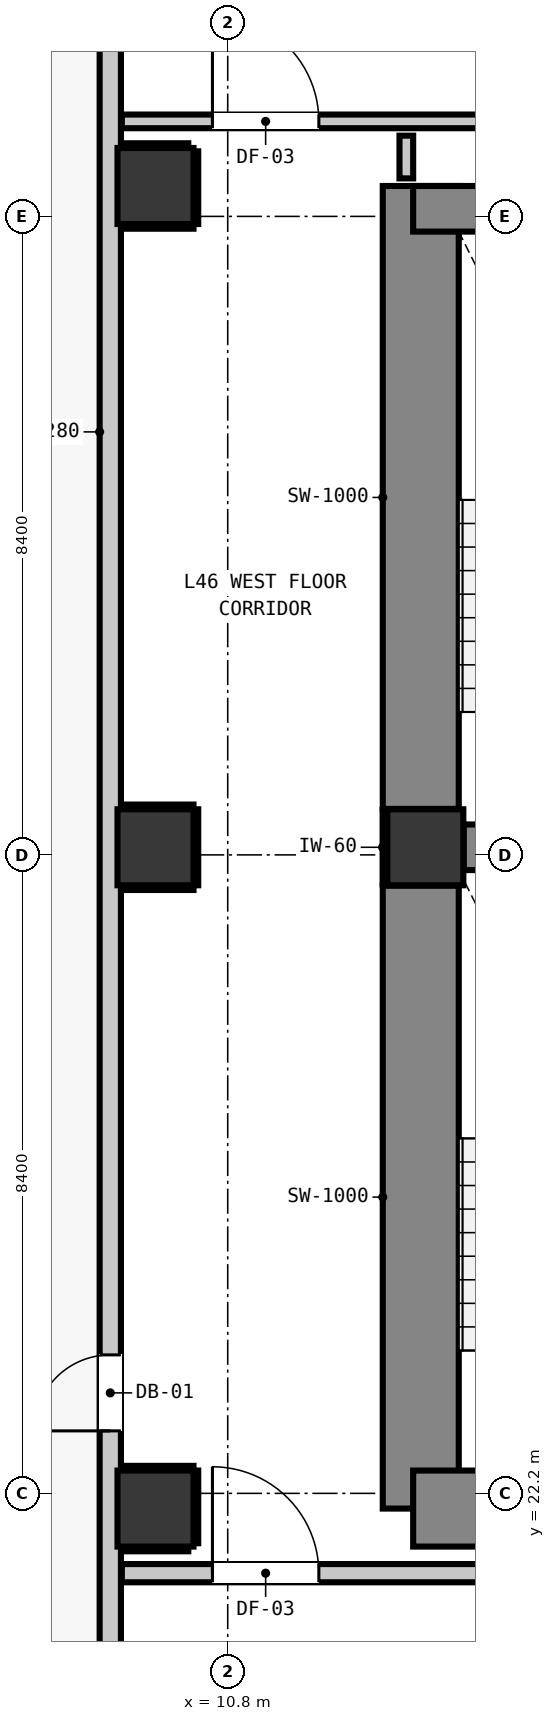
"""IFC4 building model, lengths in metres.
Left out: names, types, materials, properties, quantities, classifications, styles, units other than length and angle.
Written with IfcOpenShell. Run it as: python <this file> out.ifc"""

import sys

from ifc_helpers import new_model, si_unit, direction, frame, frame_2d, origin, origin_2d, place, context, subcontext, project, spatial, rectangle, extrude, element, fill, save


model = new_model("IFC4")
c1 = context("Model", 3, precision=1e-05, world=origin(), true_north=direction((0.0, 1.0)))
c2 = subcontext(c1, "Body", "Model", "MODEL_VIEW")
j1 = project(units=[si_unit("LENGTHUNIT", "METRE"), si_unit("PLANEANGLEUNIT", "RADIAN")], contexts=[c1])
p1 = place(None, origin())
s1 = spatial("IfcSite", under=j1, at=p1, CompositionType="ELEMENT")
p2 = place(p1, origin())
s2 = spatial("IfcBuilding", under=s1, at=p2, CompositionType="ELEMENT")
p3 = place(p2, frame((0.0, 0.0, 159.2)))
s3 = spatial("IfcBuildingStorey", under=s2, at=p3, CompositionType="ELEMENT", Elevation=159.2)
p4 = place(p3, frame((13.4, 30.7, 0.0), z_axis=(0.0, 0.0, 1.0), x_axis=(1.0, 0.0, 0.0)))
e1 = element("IfcColumn", 1, at=p4, inside=s3, PredefinedType="COLUMN", context=c2, shape_type="SweptSolid", body=[
    extrude(rectangle(XDim=1.0, YDim=1.0, at=origin_2d()), origin(), (0.0, 0.0, 1.0), 3.32),
])
p5 = place(p3, frame((13.34, 22.0, 0.0), z_axis=(0.0, 0.0, 1.0), x_axis=(0.0, 1.0, 0.0)))
e2 = element("IfcWall", 2, at=p5, inside=s3, PredefinedType="SHEAR", context=c2, shape_type="SweptSolid", body=[
    extrude(rectangle(XDim=8.195, YDim=1.0, at=frame_2d((4.098, 0.0))), origin(), (0.0, 0.0, 1.0), 3.32),
])
p6 = place(p3, frame((13.34, 31.205, 0.0), z_axis=(0.0, 0.0, 1.0), x_axis=(0.0, 1.0, 0.0)))
e3 = element("IfcWall", 3, at=p6, inside=s3, PredefinedType="SHEAR", context=c2, shape_type="SweptSolid", body=[
    extrude(rectangle(XDim=8.195, YDim=1.0, at=frame_2d((4.097, 0.0))), origin(), (0.0, 0.0, 1.0), 3.32),
])
p7 = place(p3, frame((13.24, 22.0, 0.0), z_axis=(0.0, 0.0, 1.0), x_axis=(1.0, 0.0, 0.0)))
e4 = element("IfcWall", 4, at=p7, inside=s3, PredefinedType="SHEAR", context=c2, shape_type="SweptSolid", body=[
    extrude(rectangle(XDim=4.08, YDim=1.0, at=frame_2d((2.04, 0.0))), origin(), (0.0, 0.0, 1.0), 3.32),
])
p8 = place(p3, frame((13.24, 39.1, 0.0), z_axis=(0.0, 0.0, 1.0), x_axis=(1.0, 0.0, 0.0)))
e5 = element("IfcWall", 5, at=p8, inside=s3, PredefinedType="SHEAR", context=c2, shape_type="SweptSolid", body=[
    extrude(rectangle(XDim=4.08, YDim=0.6, at=frame_2d((2.04, 0.0))), origin(), (0.0, 0.0, 1.0), 3.32),
])
p9 = place(p3, frame((13.905, 30.7, 0.0), z_axis=(0.0, 0.0, 1.0), x_axis=(1.0, 0.0, 0.0)))
e6 = element("IfcWall", 6, at=p9, inside=s3, PredefinedType="SHEAR", context=c2, shape_type="SweptSolid", body=[
    extrude(rectangle(XDim=3.415, YDim=0.6, at=frame_2d((1.708, 0.0))), origin(), (0.0, 0.0, 1.0), 3.32),
])
for number, where, z_axis, x_axis in (
    (7, (9.85, 22.0, 0.0), (0.0, 0.0, 1.0), (1.0, 0.0, 0.0)),
    (8, (9.85, 30.7, 0.0), (0.0, 0.0, 1.0), (1.0, 0.0, 0.0)),
    (9, (9.85, 39.4, 0.0), (0.0, 0.0, 1.0), (1.0, 0.0, 0.0)),
):
    element("IfcColumn", number, at=place(p3, frame(where, z_axis=z_axis, x_axis=x_axis)), inside=s3, PredefinedType="COLUMN", context=c2, shape_type="SweptSolid", body=[
        extrude(rectangle(XDim=1.0, YDim=1.0, at=origin_2d()), origin(), (0.0, 0.0, 1.0), 3.32),
    ])
p10 = place(p3, frame((9.255, 17.555, 0.0), z_axis=(0.0, 0.0, 1.0), x_axis=(0.0, 1.0, 0.0)))
e10 = element("IfcWall", 10, at=p10, inside=s3, PredefinedType="STANDARD", context=c2, shape_type="SweptSolid", body=[
    extrude(rectangle(XDim=32.29, YDim=0.28, at=frame_2d((16.145, 0.0))), origin(), (0.0, 0.0, 1.0), 3.08),
])
p11 = place(p10, frame((5.467, 0.0, 0.0)))
e11 = element("IfcOpeningElement", 11, at=p11, cuts=e10, PredefinedType="OPENING", context=c2, shape_type="SweptSolid", body=[
    extrude(rectangle(XDim=1.0, YDim=2.15, at=frame_2d((0.5, 1.075))), frame((0.0, 0.15, 0.0), z_axis=(0.0, -1.0, 0.0), x_axis=(1.0, 0.0, 0.0)), (0.0, 0.0, 1.0), 0.3),
])
p12 = place(p10, frame((0.417, 0.0, 0.85)))
e12 = element("IfcOpeningElement", 12, at=p12, cuts=e10, PredefinedType="OPENING", context=c2, shape_type="SweptSolid", body=[
    extrude(rectangle(XDim=1.05, YDim=1.65, at=frame_2d((0.525, 0.825))), frame((0.0, 0.15, 0.0), z_axis=(0.0, -1.0, 0.0), x_axis=(1.0, 0.0, 0.0)), (0.0, 0.0, 1.0), 0.3),
])
p13 = place(p10, frame((30.753, 0.0, 0.85)))
e13 = element("IfcOpeningElement", 13, at=p13, cuts=e10, PredefinedType="OPENING", context=c2, shape_type="SweptSolid", body=[
    extrude(rectangle(XDim=1.05, YDim=1.65, at=frame_2d((0.525, 0.825))), frame((0.0, 0.15, 0.0), z_axis=(0.0, -1.0, 0.0), x_axis=(1.0, 0.0, 0.0)), (0.0, 0.0, 1.0), 0.3),
])
p14 = place(p3, frame((9.407, 21.15, 0.0), z_axis=(0.0, 0.0, 1.0), x_axis=(1.0, 0.0, 0.0)))
e14 = element("IfcWall", 14, at=p14, inside=s3, PredefinedType="PARTITIONING", context=c2, shape_type="SweptSolid", body=[
    extrude(rectangle(XDim=27.532, YDim=0.24, at=frame_2d((13.766, 0.0))), origin(), (0.0, 0.0, 1.0), 3.08),
])
p15 = place(p14, frame((8.803, 0.0, 0.0)))
e15 = element("IfcOpeningElement", 15, at=p15, cuts=e14, PredefinedType="OPENING", context=c2, shape_type="SweptSolid", body=[
    extrude(rectangle(XDim=1.1, YDim=2.15, at=frame_2d((0.55, 1.075))), frame((0.0, 0.13, 0.0), z_axis=(0.0, -1.0, 0.0), x_axis=(1.0, 0.0, 0.0)), (0.0, 0.0, 1.0), 0.26),
])
p16 = place(p14, frame((1.192, 0.0, 0.0)))
e16 = element("IfcOpeningElement", 16, at=p16, cuts=e14, PredefinedType="OPENING", context=c2, shape_type="SweptSolid", body=[
    extrude(rectangle(XDim=1.4, YDim=2.15, at=frame_2d((0.7, 1.075))), frame((0.0, 0.13, 0.0), z_axis=(0.0, -1.0, 0.0), x_axis=(1.0, 0.0, 0.0)), (0.0, 0.0, 1.0), 0.26),
])
p17 = place(p3, frame((9.407, 40.25, 0.0), z_axis=(0.0, 0.0, 1.0), x_axis=(1.0, 0.0, 0.0)))
e17 = element("IfcWall", 17, at=p17, inside=s3, PredefinedType="PARTITIONING", context=c2, shape_type="SweptSolid", body=[
    extrude(rectangle(XDim=39.386, YDim=0.18, at=frame_2d((19.693, 0.0))), origin(), (0.0, 0.0, 1.0), 3.08),
])
p18 = place(p17, frame((8.028, 0.0, 0.0)))
e18 = element("IfcOpeningElement", 18, at=p18, cuts=e17, PredefinedType="OPENING", context=c2, shape_type="SweptSolid", body=[
    extrude(rectangle(XDim=1.4, YDim=2.15, at=frame_2d((0.7, 1.075))), frame((0.0, 0.1, 0.0), z_axis=(0.0, -1.0, 0.0), x_axis=(1.0, 0.0, 0.0)), (0.0, 0.0, 1.0), 0.2),
])
p19 = place(p17, frame((1.192, 0.0, 0.0)))
e19 = element("IfcOpeningElement", 19, at=p19, cuts=e17, PredefinedType="OPENING", context=c2, shape_type="SweptSolid", body=[
    extrude(rectangle(XDim=1.4, YDim=2.15, at=frame_2d((0.7, 1.075))), frame((0.0, 0.1, 0.0), z_axis=(0.0, -1.0, 0.0), x_axis=(1.0, 0.0, 0.0)), (0.0, 0.0, 1.0), 0.2),
])
p20 = place(p17, frame((28.643, 0.0, 0.0)))
e20 = element("IfcOpeningElement", 20, at=p20, cuts=e17, PredefinedType="OPENING", context=c2, shape_type="SweptSolid", body=[
    extrude(rectangle(XDim=1.4, YDim=2.15, at=frame_2d((0.7, 1.075))), frame((0.0, 0.1, 0.0), z_axis=(0.0, -1.0, 0.0), x_axis=(1.0, 0.0, 0.0)), (0.0, 0.0, 1.0), 0.2),
])
p21 = place(p17, frame((34.394, 0.0, 0.0)))
e21 = element("IfcOpeningElement", 21, at=p21, cuts=e17, PredefinedType="OPENING", context=c2, shape_type="SweptSolid", body=[
    extrude(rectangle(XDim=0.9, YDim=2.1, at=frame_2d((0.45, 1.05))), frame((0.0, 0.1, 0.0), z_axis=(0.0, -1.0, 0.0), x_axis=(1.0, 0.0, 0.0)), (0.0, 0.0, 1.0), 0.2),
])
p22 = place(p3, frame((13.15, 39.5, 0.0), z_axis=(0.0, 0.0, 1.0), x_axis=(0.0, 1.0, 0.0)))
e22 = element("IfcWall", 22, at=p22, inside=s3, PredefinedType="PARTITIONING", context=c2, shape_type="SweptSolid", body=[
    extrude(rectangle(XDim=0.562, YDim=0.18, at=frame_2d((0.281, 0.0))), origin(), (0.0, 0.0, 1.0), 2.315),
])
p23 = place(p3, frame((12.868, 30.21, 0.0), z_axis=(0.0, 0.0, 1.0), x_axis=(0.0, 1.0, 0.0)))
e23 = element("IfcWall", 23, at=p23, inside=s3, PredefinedType="PARTITIONING", context=c2, shape_type="SweptSolid", body=[
    extrude(rectangle(XDim=0.98, YDim=0.06, at=frame_2d((0.49, 0.0))), origin(), (0.0, 0.0, 1.0), 1.45),
])
p24 = place(p3, frame((9.41, 21.468, 0.0), z_axis=(0.0, 0.0, 1.0), x_axis=(1.0, 0.0, 0.0)))
e24 = element("IfcWall", 24, at=p24, inside=s3, PredefinedType="PARTITIONING", context=c2, shape_type="SweptSolid", body=[
    extrude(rectangle(XDim=0.871, YDim=0.06, at=frame_2d((0.436, 0.0))), origin(), (0.0, 0.0, 1.0), 1.45),
])
p25 = place(p3, frame((9.41, 22.532, 0.0), z_axis=(0.0, 0.0, 1.0), x_axis=(1.0, 0.0, 0.0)))
e25 = element("IfcWall", 25, at=p25, inside=s3, PredefinedType="PARTITIONING", context=c2, shape_type="SweptSolid", body=[
    extrude(rectangle(XDim=0.94, YDim=0.06, at=frame_2d((0.47, 0.0))), origin(), (0.0, 0.0, 1.0), 1.45),
])
p26 = place(p3, frame((10.382, 21.544, 0.0), z_axis=(0.0, 0.0, 1.0), x_axis=(0.0, 1.0, 0.0)))
e26 = element("IfcWall", 26, at=p26, inside=s3, PredefinedType="PARTITIONING", context=c2, shape_type="SweptSolid", body=[
    extrude(rectangle(XDim=0.956, YDim=0.06, at=frame_2d((0.478, 0.0))), origin(), (0.0, 0.0, 1.0), 1.45),
])
for number, where, z_axis, x_axis in (
    (27, (9.41, 30.168, 0.0), (0.0, 0.0, 1.0), (1.0, 0.0, 0.0)),
    (28, (9.41, 31.232, 0.0), (0.0, 0.0, 1.0), (1.0, 0.0, 0.0)),
):
    element("IfcWall", number, at=place(p3, frame(where, z_axis=z_axis, x_axis=x_axis)), inside=s3, PredefinedType="PARTITIONING", context=c2, shape_type="SweptSolid", body=[
        extrude(rectangle(XDim=0.94, YDim=0.06, at=frame_2d((0.47, 0.0))), origin(), (0.0, 0.0, 1.0), 1.45),
    ])
p27 = place(p3, frame((10.382, 30.2, 0.0), z_axis=(0.0, 0.0, 1.0), x_axis=(0.0, 1.0, 0.0)))
e29 = element("IfcWall", 29, at=p27, inside=s3, PredefinedType="PARTITIONING", context=c2, shape_type="SweptSolid", body=[
    extrude(rectangle(XDim=1.0, YDim=0.06, at=frame_2d((0.5, 0.0))), origin(), (0.0, 0.0, 1.0), 1.45),
])
p28 = place(p3, frame((9.41, 38.868, 0.0), z_axis=(0.0, 0.0, 1.0), x_axis=(1.0, 0.0, 0.0)))
e30 = element("IfcWall", 30, at=p28, inside=s3, PredefinedType="PARTITIONING", context=c2, shape_type="SweptSolid", body=[
    extrude(rectangle(XDim=0.94, YDim=0.06, at=frame_2d((0.47, 0.0))), origin(), (0.0, 0.0, 1.0), 1.45),
])
p29 = place(p3, frame((9.41, 39.932, 0.0), z_axis=(0.0, 0.0, 1.0), x_axis=(1.0, 0.0, 0.0)))
e31 = element("IfcWall", 31, at=p29, inside=s3, PredefinedType="PARTITIONING", context=c2, shape_type="SweptSolid", body=[
    extrude(rectangle(XDim=0.871, YDim=0.06, at=frame_2d((0.436, 0.0))), origin(), (0.0, 0.0, 1.0), 1.45),
])
p30 = place(p3, frame((10.382, 38.9, 0.0), z_axis=(0.0, 0.0, 1.0), x_axis=(0.0, 1.0, 0.0)))
e32 = element("IfcWall", 32, at=p30, inside=s3, PredefinedType="PARTITIONING", context=c2, shape_type="SweptSolid", body=[
    extrude(rectangle(XDim=0.956, YDim=0.06, at=frame_2d((0.478, 0.0))), origin(), (0.0, 0.0, 1.0), 1.45),
])
p31 = place(p11, origin())
e33 = element("IfcDoor", 33, at=p31, inside=s3, OperationType="SINGLE_SWING_LEFT", PredefinedType="DOOR", context=c2, shape_type="SweptSolid", body=[
    extrude(rectangle(XDim=1.0, YDim=2.15, at=frame_2d((0.5, 1.075))), frame((0.0, 0.025, 0.0), z_axis=(0.0, -1.0, 0.0), x_axis=(1.0, 0.0, 0.0)), (0.0, 0.0, 1.0), 0.05),
])
fill(e11, e33)
p32 = place(p16, origin())
e34 = element("IfcDoor", 34, at=p32, inside=s3, OperationType="SINGLE_SWING_LEFT", PredefinedType="DOOR", context=c2, shape_type="SweptSolid", body=[
    extrude(rectangle(XDim=1.4, YDim=2.15, at=frame_2d((0.7, 1.075))), frame((0.0, 0.025, 0.0), z_axis=(0.0, -1.0, 0.0), x_axis=(1.0, 0.0, 0.0)), (0.0, 0.0, 1.0), 0.05),
])
fill(e16, e34)
p33 = place(p19, origin())
e35 = element("IfcDoor", 35, at=p33, inside=s3, OperationType="SINGLE_SWING_LEFT", PredefinedType="DOOR", context=c2, shape_type="SweptSolid", body=[
    extrude(rectangle(XDim=1.4, YDim=2.15, at=frame_2d((0.7, 1.075))), frame((0.0, 0.025, 0.0), z_axis=(0.0, -1.0, 0.0), x_axis=(1.0, 0.0, 0.0)), (0.0, 0.0, 1.0), 0.05),
])
fill(e19, e35)
save(model, sys.argv[1])
